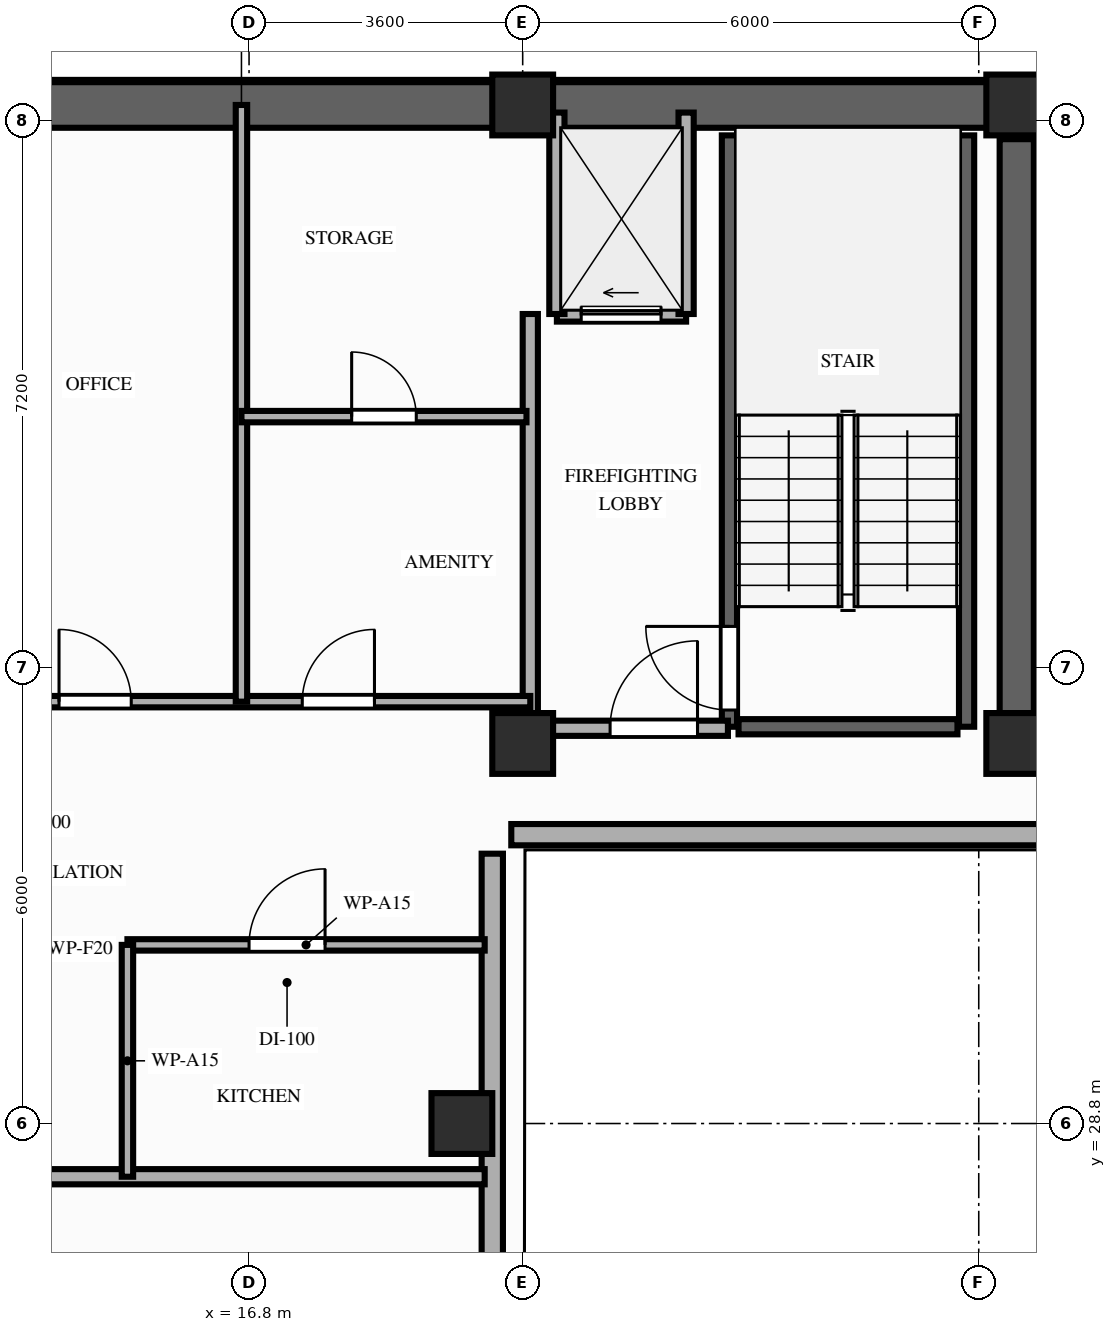
"""IFC4 building model, lengths in metres.
Left out: names, types, materials, properties, quantities, classifications, styles, units other than length and angle.
Written with IfcOpenShell. Run it as: python <this file> out.ifc"""

import sys

from ifc_helpers import new_model, si_unit, direction, frame, frame_2d, origin, origin_2d, place, context, subcontext, project, spatial, rectangle, extrude, element, fill, save


model = new_model("IFC4")
c1 = context("Model", 3, precision=1e-05, world=origin(), true_north=direction((0.0, 1.0)))
c2 = subcontext(c1, "Body", "Model", "MODEL_VIEW")
j1 = project(units=[si_unit("LENGTHUNIT", "METRE"), si_unit("PLANEANGLEUNIT", "RADIAN")], contexts=[c1])
p1 = place(None, origin())
s1 = spatial("IfcSite", under=j1, at=p1, CompositionType="ELEMENT")
p2 = place(p1, origin())
s2 = spatial("IfcBuilding", under=s1, at=p2, CompositionType="ELEMENT")
p3 = place(p2, frame((0.0, 0.0, 218.4)))
s3 = spatial("IfcBuildingStorey", under=s2, at=p3, CompositionType="ELEMENT", Elevation=218.4)
for number, where, z_axis, x_axis in (
    (1, (20.4, 33.8, 0.0), (0.0, 0.0, 1.0), (1.0, 0.0, 0.0)),
    (2, (26.9, 33.8, 0.0), (0.0, 0.0, 1.0), (1.0, 0.0, 0.0)),
    (3, (20.4, 42.2, 0.0), (0.0, 0.0, 1.0), (1.0, 0.0, 0.0)),
    (4, (26.9, 42.2, 0.0), (0.0, 0.0, 1.0), (1.0, 0.0, 0.0)),
    (5, (19.6, 28.8, 0.0), (0.0, 0.0, 1.0), (1.0, 0.0, 0.0)),
):
    element("IfcColumn", number, at=place(p3, frame(where, z_axis=z_axis, x_axis=x_axis)), inside=s3, PredefinedType="COLUMN", context=c2, shape_type="SweptSolid", body=[
        extrude(rectangle(XDim=0.8, YDim=0.8, at=origin_2d()), origin(), (0.0, 0.0, 1.0), 3.2),
    ])
p4 = place(p3, frame((20.0, 8.8, 0.0), z_axis=(0.0, 0.0, 1.0), x_axis=(0.0, 1.0, 0.0)))
e6 = element("IfcWall", 6, at=p4, inside=s3, PredefinedType="STANDARD", context=c2, shape_type="SweptSolid", body=[
    extrude(rectangle(XDim=23.55, YDim=0.28, at=frame_2d((11.775, 0.0))), origin(), (0.0, 0.0, 1.0), 2.51),
])
p5 = place(p4, frame((1.84, 0.0, 0.85)))
e7 = element("IfcOpeningElement", 7, at=p5, cuts=e6, PredefinedType="OPENING", context=c2, shape_type="SweptSolid", body=[
    extrude(rectangle(XDim=1.1, YDim=1.41, at=frame_2d((0.55, 0.705))), frame((0.0, 0.15, 0.0), z_axis=(0.0, -1.0, 0.0), x_axis=(1.0, 0.0, 0.0)), (0.0, 0.0, 1.0), 0.3),
])
p6 = place(p4, frame((5.45, 0.0, 0.85)))
e8 = element("IfcOpeningElement", 8, at=p6, cuts=e6, PredefinedType="OPENING", context=c2, shape_type="SweptSolid", body=[
    extrude(rectangle(XDim=2.1, YDim=1.41, at=frame_2d((1.05, 0.705))), frame((0.0, 0.15, 0.0), z_axis=(0.0, -1.0, 0.0), x_axis=(1.0, 0.0, 0.0)), (0.0, 0.0, 1.0), 0.3),
])
p7 = place(p4, frame((10.85, 0.0, 0.85)))
e9 = element("IfcOpeningElement", 9, at=p7, cuts=e6, PredefinedType="OPENING", context=c2, shape_type="SweptSolid", body=[
    extrude(rectangle(XDim=2.1, YDim=1.41, at=frame_2d((1.05, 0.705))), frame((0.0, 0.15, 0.0), z_axis=(0.0, -1.0, 0.0), x_axis=(1.0, 0.0, 0.0)), (0.0, 0.0, 1.0), 0.3),
])
p8 = place(p3, frame((20.25, 32.6, 0.0), z_axis=(0.0, 0.0, 1.0), x_axis=(1.0, 0.0, 0.0)))
e10 = element("IfcWall", 10, at=p8, inside=s3, PredefinedType="STANDARD", context=c2, shape_type="SweptSolid", body=[
    extrude(rectangle(XDim=7.35, YDim=0.28, at=frame_2d((3.675, 0.0))), origin(), (0.0, 0.0, 1.0), 2.51),
])
p9 = place(p3, frame((6.45, 42.2, 0.0), z_axis=(0.0, 0.0, 1.0), x_axis=(1.0, 0.0, 0.0)))
e11 = element("IfcWall", 11, at=p9, inside=s3, PredefinedType="SHEAR", context=c2, shape_type="SweptSolid", body=[
    extrude(rectangle(XDim=20.45, YDim=0.6, at=frame_2d((10.225, 0.0))), origin(), (0.0, 0.0, 1.0), 3.02),
])
p10 = place(p3, frame((26.9, 33.8, 0.0), z_axis=(0.0, 0.0, 1.0), x_axis=(0.0, 1.0, 0.0)))
e12 = element("IfcWall", 12, at=p10, inside=s3, PredefinedType="SHEAR", context=c2, shape_type="SweptSolid", body=[
    extrude(rectangle(XDim=7.95, YDim=0.45, at=frame_2d((3.975, 0.0))), origin(), (0.0, 0.0, 1.0), 3.02),
])
p11 = place(p3, frame((23.12, 34.02, 0.0), z_axis=(0.0, 0.0, 1.0), x_axis=(0.0, 1.0, 0.0)))
e13 = element("IfcWall", 13, at=p11, inside=s3, PredefinedType="SHEAR", context=c2, shape_type="SweptSolid", body=[
    extrude(rectangle(XDim=7.78, YDim=0.2, at=frame_2d((3.89, 0.0))), origin(), (0.0, 0.0, 1.0), 3.02),
])
p12 = place(p11, frame((0.22, 0.0, 0.0)))
e14 = element("IfcOpeningElement", 14, at=p12, cuts=e13, PredefinedType="OPENING", context=c2, shape_type="SweptSolid", body=[
    extrude(rectangle(XDim=1.1, YDim=2.15, at=frame_2d((0.55, 1.075))), frame((0.0, 0.11, 0.0), z_axis=(0.0, -1.0, 0.0), x_axis=(1.0, 0.0, 0.0)), (0.0, 0.0, 1.0), 0.22),
])
p13 = place(p3, frame((26.24, 34.02, 0.0), z_axis=(0.0, 0.0, 1.0), x_axis=(0.0, 1.0, 0.0)))
e15 = element("IfcWall", 15, at=p13, inside=s3, PredefinedType="SHEAR", context=c2, shape_type="SweptSolid", body=[
    extrude(rectangle(XDim=7.78, YDim=0.2, at=frame_2d((3.89, 0.0))), origin(), (0.0, 0.0, 1.0), 3.02),
])
p14 = place(p3, frame((23.24, 34.02, 0.0), z_axis=(0.0, 0.0, 1.0), x_axis=(1.0, 0.0, 0.0)))
e16 = element("IfcWall", 16, at=p14, inside=s3, PredefinedType="SHEAR", context=c2, shape_type="SweptSolid", body=[
    extrude(rectangle(XDim=2.88, YDim=0.2, at=frame_2d((1.44, 0.0))), origin(), (0.0, 0.0, 1.0), 3.02),
])
p15 = place(p3, frame((20.85, 39.45, 0.0), z_axis=(0.0, 0.0, 1.0), x_axis=(1.0, 0.0, 0.0)))
e17 = element("IfcWall", 17, at=p15, inside=s3, PredefinedType="MOVABLE", context=c2, shape_type="SweptSolid", body=[
    extrude(rectangle(XDim=1.7, YDim=0.2, at=frame_2d((0.85, 0.0))), origin(), (0.0, 0.0, 1.0), 3.02),
])
p16 = place(p15, frame((0.32, 0.0, 0.0)))
e18 = element("IfcOpeningElement", 18, at=p16, cuts=e17, PredefinedType="OPENING", context=c2, shape_type="SweptSolid", body=[
    extrude(rectangle(XDim=1.05, YDim=2.15, at=frame_2d((0.525, 1.075))), frame((0.0, 0.11, 0.0), z_axis=(0.0, -1.0, 0.0), x_axis=(1.0, 0.0, 0.0)), (0.0, 0.0, 1.0), 0.22),
])
for number, where, z_axis, x_axis in (
    (19, (20.85, 39.45, 0.0), (0.0, 0.0, 1.0), (0.0, 1.0, 0.0)),
    (20, (22.55, 39.45, 0.0), (0.0, 0.0, 1.0), (0.0, 1.0, 0.0)),
):
    element("IfcWall", number, at=place(p3, frame(where, z_axis=z_axis, x_axis=x_axis)), inside=s3, PredefinedType="MOVABLE", context=c2, shape_type="SweptSolid", body=[
        extrude(rectangle(XDim=2.65, YDim=0.2, at=frame_2d((1.325, 0.0))), origin(), (0.0, 0.0, 1.0), 2.51),
    ])
p17 = place(p3, frame((20.5, 34.0, 0.0), z_axis=(0.0, 0.0, 1.0), x_axis=(0.0, 1.0, 0.0)))
e21 = element("IfcWall", 21, at=p17, inside=s3, PredefinedType="PARTITIONING", context=c2, shape_type="SweptSolid", body=[
    extrude(rectangle(XDim=5.45, YDim=0.2, at=frame_2d((2.725, 0.0))), origin(), (0.0, 0.0, 1.0), 2.51),
])
p18 = place(p3, frame((20.5, 34.0, 0.0), z_axis=(0.0, 0.0, 1.0), x_axis=(1.0, 0.0, 0.0)))
e22 = element("IfcWall", 22, at=p18, inside=s3, PredefinedType="PARTITIONING", context=c2, shape_type="SweptSolid", body=[
    extrude(rectangle(XDim=2.6, YDim=0.2, at=frame_2d((1.3, 0.0))), origin(), (0.0, 0.0, 1.0), 2.51),
])
p19 = place(p18, frame((1.05, 0.0, 0.0)))
e23 = element("IfcOpeningElement", 23, at=p19, cuts=e22, PredefinedType="OPENING", context=c2, shape_type="SweptSolid", body=[
    extrude(rectangle(XDim=1.15, YDim=2.15, at=frame_2d((0.575, 1.075))), frame((0.0, 0.11, 0.0), z_axis=(0.0, -1.0, 0.0), x_axis=(1.0, 0.0, 0.0)), (0.0, 0.0, 1.0), 0.22),
])
p20 = place(p3, frame((12.9, 34.35, 0.0), z_axis=(0.0, 0.0, 1.0), x_axis=(1.0, 0.0, 0.0)))
e24 = element("IfcWall", 24, at=p20, inside=s3, PredefinedType="PARTITIONING", context=c2, shape_type="SweptSolid", body=[
    extrude(rectangle(XDim=7.6, YDim=0.15, at=frame_2d((3.8, 0.0))), origin(), (0.0, 0.0, 1.0), 3.02),
])
p21 = place(p20, frame((1.4, 0.0, 0.0)))
e25 = element("IfcOpeningElement", 25, at=p21, cuts=e24, PredefinedType="OPENING", context=c2, shape_type="SweptSolid", body=[
    extrude(rectangle(XDim=0.95, YDim=2.15, at=frame_2d((0.475, 1.075))), frame((0.0, 0.085, 0.0), z_axis=(0.0, -1.0, 0.0), x_axis=(1.0, 0.0, 0.0)), (0.0, 0.0, 1.0), 0.17),
])
p22 = place(p20, frame((4.6, 0.0, 0.0)))
e26 = element("IfcOpeningElement", 26, at=p22, cuts=e24, PredefinedType="OPENING", context=c2, shape_type="SweptSolid", body=[
    extrude(rectangle(XDim=0.95, YDim=2.15, at=frame_2d((0.475, 1.075))), frame((0.0, 0.085, 0.0), z_axis=(0.0, -1.0, 0.0), x_axis=(1.0, 0.0, 0.0)), (0.0, 0.0, 1.0), 0.17),
])
p23 = place(p3, frame((16.7, 34.35, 0.0), z_axis=(0.0, 0.0, 1.0), x_axis=(0.0, 1.0, 0.0)))
e27 = element("IfcWall", 27, at=p23, inside=s3, PredefinedType="PARTITIONING", context=c2, shape_type="SweptSolid", body=[
    extrude(rectangle(XDim=7.85, YDim=0.15, at=frame_2d((3.925, 0.0))), origin(), (0.0, 0.0, 1.0), 2.51),
])
p24 = place(p3, frame((16.7, 38.1, 0.0), z_axis=(0.0, 0.0, 1.0), x_axis=(1.0, 0.0, 0.0)))
e28 = element("IfcWall", 28, at=p24, inside=s3, PredefinedType="PARTITIONING", context=c2, shape_type="SweptSolid", body=[
    extrude(rectangle(XDim=3.75, YDim=0.15, at=frame_2d((1.875, 0.0))), origin(), (0.0, 0.0, 1.0), 3.02),
])
p25 = place(p24, frame((1.45, 0.0, 0.0)))
e29 = element("IfcOpeningElement", 29, at=p25, cuts=e28, PredefinedType="OPENING", context=c2, shape_type="SweptSolid", body=[
    extrude(rectangle(XDim=0.85, YDim=2.05, at=frame_2d((0.425, 1.025))), frame((0.0, 0.085, 0.0), z_axis=(0.0, -1.0, 0.0), x_axis=(1.0, 0.0, 0.0)), (0.0, 0.0, 1.0), 0.17),
])
p26 = place(p3, frame((9.06, 28.1, 0.0), z_axis=(0.0, 0.0, 1.0), x_axis=(1.0, 0.0, 0.0)))
e30 = element("IfcWall", 30, at=p26, inside=s3, PredefinedType="PARTITIONING", context=c2, shape_type="SweptSolid", body=[
    extrude(rectangle(XDim=10.84, YDim=0.2, at=frame_2d((5.42, 0.0))), origin(), (0.0, 0.0, 1.0), 2.51),
])
p27 = place(p3, frame((15.2, 31.15, 0.0), z_axis=(0.0, 0.0, 1.0), x_axis=(1.0, 0.0, 0.0)))
e31 = element("IfcWall", 31, at=p27, inside=s3, PredefinedType="PARTITIONING", context=c2, shape_type="SweptSolid", body=[
    extrude(rectangle(XDim=4.7, YDim=0.15, at=frame_2d((2.35, 0.0))), origin(), (0.0, 0.0, 1.0), 2.51),
])
p28 = place(p27, frame((1.6, 0.0, 0.0)))
e32 = element("IfcOpeningElement", 32, at=p28, cuts=e31, PredefinedType="OPENING", context=c2, shape_type="SweptSolid", body=[
    extrude(rectangle(XDim=1.0, YDim=2.15, at=frame_2d((0.5, 1.075))), frame((0.0, 0.085, 0.0), z_axis=(0.0, -1.0, 0.0), x_axis=(1.0, 0.0, 0.0)), (0.0, 0.0, 1.0), 0.17),
])
p29 = place(p3, frame((15.2, 28.1, 0.0), z_axis=(0.0, 0.0, 1.0), x_axis=(0.0, 1.0, 0.0)))
e33 = element("IfcWall", 33, at=p29, inside=s3, PredefinedType="PARTITIONING", context=c2, shape_type="SweptSolid", body=[
    extrude(rectangle(XDim=3.05, YDim=0.15, at=frame_2d((1.525, 0.0))), origin(), (0.0, 0.0, 1.0), 2.51),
])
p30 = place(p12, origin())
e34 = element("IfcDoor", 34, at=p30, inside=s3, OperationType="SINGLE_SWING_RIGHT", PredefinedType="DOOR", context=c2, shape_type="SweptSolid", body=[
    extrude(rectangle(XDim=1.1, YDim=2.15, at=frame_2d((0.55, 1.075))), frame((0.0, 0.025, 0.0), z_axis=(0.0, -1.0, 0.0), x_axis=(1.0, 0.0, 0.0)), (0.0, 0.0, 1.0), 0.05),
])
fill(e14, e34)
p31 = place(p16, origin())
e35 = element("IfcDoor", 35, at=p31, inside=s3, OperationType="SLIDING_TO_LEFT", PredefinedType="DOOR", context=c2, shape_type="SweptSolid", body=[
    extrude(rectangle(XDim=1.05, YDim=2.15, at=frame_2d((0.525, 1.075))), frame((0.0, 0.025, 0.0), z_axis=(0.0, -1.0, 0.0), x_axis=(1.0, 0.0, 0.0)), (0.0, 0.0, 1.0), 0.05),
])
fill(e18, e35)
p32 = place(p19, origin())
e36 = element("IfcDoor", 36, at=p32, inside=s3, OperationType="SINGLE_SWING_RIGHT", PredefinedType="DOOR", context=c2, shape_type="SweptSolid", body=[
    extrude(rectangle(XDim=1.15, YDim=2.15, at=frame_2d((0.575, 1.075))), frame((0.0, 0.025, 0.0), z_axis=(0.0, -1.0, 0.0), x_axis=(1.0, 0.0, 0.0)), (0.0, 0.0, 1.0), 0.05),
])
fill(e23, e36)
p33 = place(p21, origin())
e37 = element("IfcDoor", 37, at=p33, inside=s3, OperationType="SINGLE_SWING_LEFT", PredefinedType="DOOR", context=c2, shape_type="SweptSolid", body=[
    extrude(rectangle(XDim=0.95, YDim=2.15, at=frame_2d((0.475, 1.075))), frame((0.0, 0.025, 0.0), z_axis=(0.0, -1.0, 0.0), x_axis=(1.0, 0.0, 0.0)), (0.0, 0.0, 1.0), 0.05),
])
fill(e25, e37)
p34 = place(p22, origin())
e38 = element("IfcDoor", 38, at=p34, inside=s3, OperationType="SINGLE_SWING_RIGHT", PredefinedType="DOOR", context=c2, shape_type="SweptSolid", body=[
    extrude(rectangle(XDim=0.95, YDim=2.15, at=frame_2d((0.475, 1.075))), frame((0.0, 0.025, 0.0), z_axis=(0.0, -1.0, 0.0), x_axis=(1.0, 0.0, 0.0)), (0.0, 0.0, 1.0), 0.05),
])
fill(e26, e38)
p35 = place(p25, origin())
e39 = element("IfcDoor", 39, at=p35, inside=s3, OperationType="SINGLE_SWING_LEFT", PredefinedType="DOOR", context=c2, shape_type="SweptSolid", body=[
    extrude(rectangle(XDim=0.85, YDim=2.05, at=frame_2d((0.425, 1.025))), frame((0.0, 0.025, 0.0), z_axis=(0.0, -1.0, 0.0), x_axis=(1.0, 0.0, 0.0)), (0.0, 0.0, 1.0), 0.05),
])
fill(e29, e39)
p36 = place(p28, origin())
e40 = element("IfcDoor", 40, at=p36, inside=s3, OperationType="SINGLE_SWING_RIGHT", PredefinedType="DOOR", context=c2, shape_type="SweptSolid", body=[
    extrude(rectangle(XDim=1.0, YDim=2.15, at=frame_2d((0.5, 1.075))), frame((0.0, 0.025, 0.0), z_axis=(0.0, -1.0, 0.0), x_axis=(1.0, 0.0, 0.0)), (0.0, 0.0, 1.0), 0.05),
])
fill(e32, e40)
save(model, sys.argv[1])
